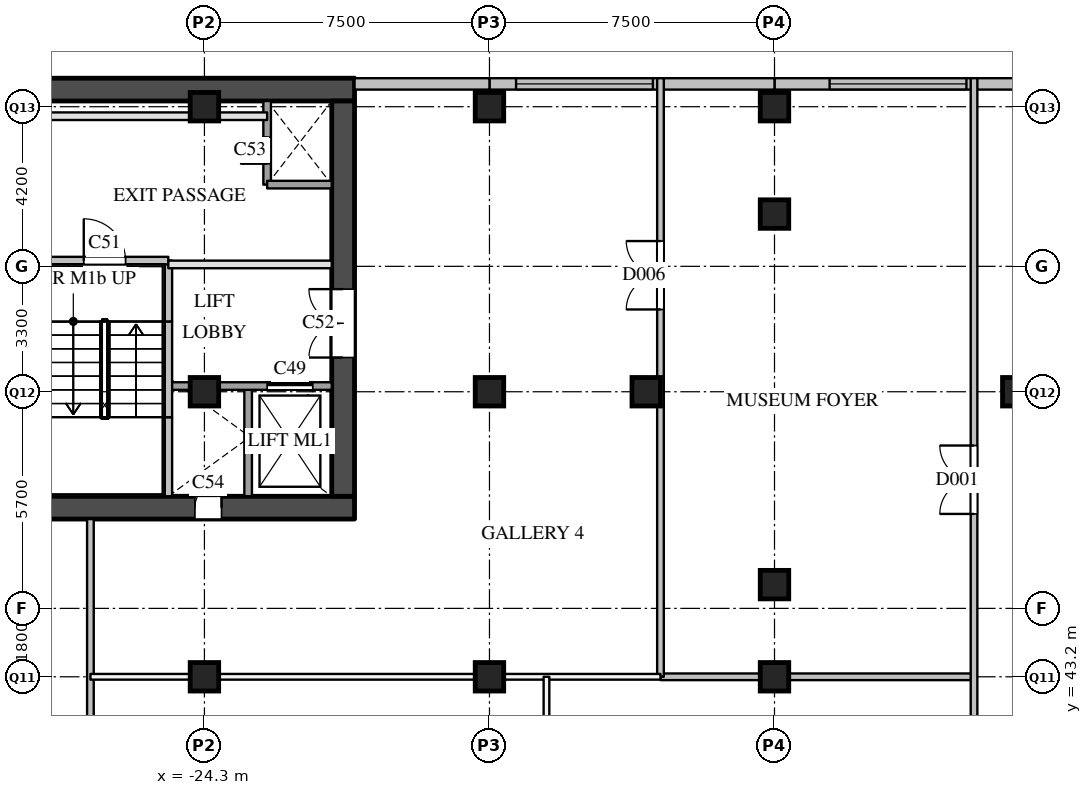
"""IFC4 building model, lengths in metres.
Left out: names, types, materials, properties, quantities, classifications, styles, units other than length and angle.
Written with IfcOpenShell. Run it as: python <this file> out.ifc"""

import sys

from ifc_helpers import new_model, si_unit, direction, frame, frame_2d, origin, origin_2d, place, context, subcontext, project, spatial, rectangle, extrude, element, fill, save


model = new_model("IFC4")
c1 = context("Model", 3, precision=1e-05, world=origin(), true_north=direction((0.0, 1.0)))
c2 = subcontext(c1, "Body", "Model", "MODEL_VIEW")
j1 = project(units=[si_unit("LENGTHUNIT", "METRE"), si_unit("PLANEANGLEUNIT", "RADIAN")], contexts=[c1])
p1 = place(None, origin())
s1 = spatial("IfcSite", under=j1, at=p1, CompositionType="ELEMENT")
p2 = place(p1, origin())
s2 = spatial("IfcBuilding", under=s1, at=p2, CompositionType="ELEMENT")
p3 = place(p2, origin())
s3 = spatial("IfcBuildingStorey", under=s2, at=p3, CompositionType="ELEMENT", Elevation=0.0)
for number, where, z_axis, x_axis in (
    (1, (-24.3, 43.2, 0.0), (0.0, 0.0, 1.0), (1.0, 0.0, 0.0)),
    (2, (-24.3, 50.7, 0.0), (0.0, 0.0, 1.0), (1.0, 0.0, 0.0)),
    (3, (-24.3, 58.2, 0.0), (0.0, 0.0, 1.0), (1.0, 0.0, 0.0)),
    (4, (-16.8, 43.2, 0.0), (0.0, 0.0, 1.0), (1.0, 0.0, 0.0)),
    (5, (-16.8, 50.7, 0.0), (0.0, 0.0, 1.0), (1.0, 0.0, 0.0)),
    (6, (-16.8, 58.2, 0.0), (0.0, 0.0, 1.0), (1.0, 0.0, 0.0)),
    (7, (-9.3, 43.2, 0.0), (0.0, 0.0, 1.0), (1.0, 0.0, 0.0)),
    (8, (-9.3, 58.2, 0.0), (0.0, 0.0, 1.0), (1.0, 0.0, 0.0)),
    (9, (-12.675, 50.7, 0.0), (0.0, 0.0, 1.0), (1.0, 0.0, 0.0)),
    (10, (-9.3, 45.625, 0.0), (0.0, 0.0, 1.0), (1.0, 0.0, 0.0)),
    (11, (-9.3, 55.375, 0.0), (0.0, 0.0, 1.0), (1.0, 0.0, 0.0)),
    (12, (-2.925, 50.7, 0.0), (0.0, 0.0, 1.0), (1.0, 0.0, 0.0)),
):
    element("IfcColumn", number, at=place(p3, frame(where, z_axis=z_axis, x_axis=x_axis)), inside=s3, PredefinedType="COLUMN", context=c2, shape_type="SweptSolid", body=[
        extrude(rectangle(XDim=0.75, YDim=0.75, at=origin_2d()), origin(), (0.0, 0.0, 1.0), 8.0),
    ])
p4 = place(p3, frame((-1.8, 58.8, 0.0), z_axis=(0.0, 0.0, 1.0), x_axis=(-1.0, 0.0, 0.0)))
e13 = element("IfcWall", 13, at=p4, inside=s3, PredefinedType="SOLIDWALL", context=c2, shape_type="SweptSolid", body=[
    extrude(rectangle(XDim=7.5, YDim=0.3, at=frame_2d((3.75, 0.0))), origin(), (0.0, 0.0, 1.0), 7.59),
])
p5 = place(p4, frame((2.45, 0.0, 0.9)))
e14 = element("IfcOpeningElement", 14, at=p5, cuts=e13, PredefinedType="OPENING", context=c2, shape_type="SweptSolid", body=[
    extrude(rectangle(XDim=3.6, YDim=3.0, at=frame_2d((1.8, 1.5))), frame((0.0, 0.16, 0.0), z_axis=(0.0, -1.0, 0.0), x_axis=(1.0, 0.0, 0.0)), (0.0, 0.0, 1.0), 0.32),
])
p6 = place(p3, frame((-9.3, 58.8, 0.0), z_axis=(0.0, 0.0, 1.0), x_axis=(-1.0, 0.0, 0.0)))
e15 = element("IfcWall", 15, at=p6, inside=s3, PredefinedType="SOLIDWALL", context=c2, shape_type="SweptSolid", body=[
    extrude(rectangle(XDim=7.5, YDim=0.3, at=frame_2d((3.75, 0.0))), origin(), (0.0, 0.0, 1.0), 7.59),
])
p7 = place(p6, frame((3.2, 0.0, 0.9)))
e16 = element("IfcOpeningElement", 16, at=p7, cuts=e15, PredefinedType="OPENING", context=c2, shape_type="SweptSolid", body=[
    extrude(rectangle(XDim=3.6, YDim=3.0, at=frame_2d((1.8, 1.5))), frame((0.0, 0.16, 0.0), z_axis=(0.0, -1.0, 0.0), x_axis=(1.0, 0.0, 0.0)), (0.0, 0.0, 1.0), 0.32),
])
p8 = place(p3, frame((-16.8, 58.8, 0.0), z_axis=(0.0, 0.0, 1.0), x_axis=(-1.0, 0.0, 0.0)))
e17 = element("IfcWall", 17, at=p8, inside=s3, PredefinedType="SOLIDWALL", context=c2, shape_type="SweptSolid", body=[
    extrude(rectangle(XDim=3.55, YDim=0.3, at=frame_2d((1.775, 0.0))), origin(), (0.0, 0.0, 1.0), 7.59),
])
p9 = place(p3, frame((-32.55, 47.65, 0.0), z_axis=(0.0, 0.0, 1.0), x_axis=(1.0, 0.0, 0.0)))
e18 = element("IfcWall", 18, at=p9, inside=s3, PredefinedType="SHEAR", context=c2, shape_type="SweptSolid", body=[
    extrude(rectangle(XDim=12.2, YDim=0.6, at=frame_2d((6.1, 0.0))), origin(), (0.0, 0.0, 1.0), 7.59),
])
p10 = place(p9, frame((8.0, 0.0, 0.0)))
e19 = element("IfcOpeningElement", 19, at=p10, cuts=e18, PredefinedType="OPENING", context=c2, shape_type="SweptSolid", body=[
    extrude(rectangle(XDim=0.7, YDim=2.1, at=frame_2d((0.35, 1.05))), frame((0.0, 0.31, 0.0), z_axis=(0.0, -1.0, 0.0), x_axis=(1.0, 0.0, 0.0)), (0.0, 0.0, 1.0), 0.62),
])
p11 = place(p3, frame((-32.55, 58.65, 0.0), z_axis=(0.0, 0.0, 1.0), x_axis=(1.0, 0.0, 0.0)))
e20 = element("IfcWall", 20, at=p11, inside=s3, PredefinedType="SHEAR", context=c2, shape_type="SweptSolid", body=[
    extrude(rectangle(XDim=12.2, YDim=0.6, at=frame_2d((6.1, 0.0))), origin(), (0.0, 0.0, 1.0), 7.59),
])
p12 = place(p3, frame((-20.65, 47.95, 0.0), z_axis=(0.0, 0.0, 1.0), x_axis=(0.0, 1.0, 0.0)))
e21 = element("IfcWall", 21, at=p12, inside=s3, PredefinedType="SHEAR", context=c2, shape_type="SweptSolid", body=[
    extrude(rectangle(XDim=10.4, YDim=0.6, at=frame_2d((5.2, 0.0))), origin(), (0.0, 0.0, 1.0), 7.59),
])
p13 = place(p12, frame((3.65, 0.0, 0.0)))
e22 = element("IfcOpeningElement", 22, at=p13, cuts=e21, PredefinedType="OPENING", context=c2, shape_type="SweptSolid", body=[
    extrude(rectangle(XDim=1.8, YDim=2.1, at=frame_2d((0.9, 1.05))), frame((0.0, 0.31, 0.0), z_axis=(0.0, -1.0, 0.0), x_axis=(1.0, 0.0, 0.0)), (0.0, 0.0, 1.0), 0.62),
])
p14 = place(p3, frame((-25.25, 47.95, 0.0), z_axis=(0.0, 0.0, 1.0), x_axis=(0.0, 1.0, 0.0)))
e23 = element("IfcWall", 23, at=p14, inside=s3, PredefinedType="SOLIDWALL", context=c2, shape_type="SweptSolid", body=[
    extrude(rectangle(XDim=2.08, YDim=0.2, at=frame_2d((1.04, 0.0))), origin(), (0.0, 0.0, 1.0), 7.59),
])
p15 = place(p3, frame((-25.25, 50.03, 0.0), z_axis=(0.0, 0.0, 1.0), x_axis=(0.0, 1.0, 0.0)))
e24 = element("IfcWall", 24, at=p15, inside=s3, PredefinedType="SOLIDWALL", context=c2, shape_type="SweptSolid", body=[
    extrude(rectangle(XDim=2.52, YDim=0.2, at=frame_2d((1.26, 0.0))), origin(), (0.0, 0.0, 1.0), 7.59),
])
p16 = place(p3, frame((-25.25, 52.55, 0.0), z_axis=(0.0, 0.0, 1.0), x_axis=(0.0, 1.0, 0.0)))
e25 = element("IfcWall", 25, at=p16, inside=s3, PredefinedType="SOLIDWALL", context=c2, shape_type="SweptSolid", body=[
    extrude(rectangle(XDim=1.6, YDim=0.2, at=frame_2d((0.8, 0.0))), origin(), (0.0, 0.0, 1.0), 7.59),
])
p17 = place(p3, frame((-23.15, 47.95, 0.0), z_axis=(0.0, 0.0, 1.0), x_axis=(0.0, 1.0, 0.0)))
e26 = element("IfcWall", 26, at=p17, inside=s3, PredefinedType="SOLIDWALL", context=c2, shape_type="SweptSolid", body=[
    extrude(rectangle(XDim=2.9, YDim=0.2, at=frame_2d((1.45, 0.0))), origin(), (0.0, 0.0, 1.0), 7.59),
])
p18 = place(p3, frame((-22.65, 56.15, 0.0), z_axis=(0.0, 0.0, 1.0), x_axis=(0.0, 1.0, 0.0)))
e27 = element("IfcWall", 27, at=p18, inside=s3, PredefinedType="SOLIDWALL", context=c2, shape_type="SweptSolid", body=[
    extrude(rectangle(XDim=2.2, YDim=0.2, at=frame_2d((1.1, 0.0))), origin(), (0.0, 0.0, 1.0), 7.59),
])
p19 = place(p18, frame((0.55, 0.0, 0.0)))
e28 = element("IfcOpeningElement", 28, at=p19, cuts=e27, PredefinedType="OPENING", context=c2, shape_type="SweptSolid", body=[
    extrude(rectangle(XDim=0.7, YDim=2.1, at=frame_2d((0.35, 1.05))), frame((0.0, 0.11, 0.0), z_axis=(0.0, -1.0, 0.0), x_axis=(1.0, 0.0, 0.0)), (0.0, 0.0, 1.0), 0.22),
])
p20 = place(p3, frame((-25.25, 50.85, 0.0), z_axis=(0.0, 0.0, 1.0), x_axis=(1.0, 0.0, 0.0)))
e29 = element("IfcWall", 29, at=p20, inside=s3, PredefinedType="SOLIDWALL", context=c2, shape_type="SweptSolid", body=[
    extrude(rectangle(XDim=4.3, YDim=0.2, at=frame_2d((2.15, 0.0))), origin(), (0.0, 0.0, 1.0), 7.59),
])
p21 = place(p20, frame((2.6, 0.0, 0.0)))
e30 = element("IfcOpeningElement", 30, at=p21, cuts=e29, PredefinedType="OPENING", context=c2, shape_type="SweptSolid", body=[
    extrude(rectangle(XDim=1.2, YDim=2.1, at=frame_2d((0.6, 1.05))), frame((0.0, 0.11, 0.0), z_axis=(0.0, -1.0, 0.0), x_axis=(1.0, 0.0, 0.0)), (0.0, 0.0, 1.0), 0.22),
])
p22 = place(p3, frame((-25.25, 54.05, 0.0), z_axis=(0.0, 0.0, 1.0), x_axis=(1.0, 0.0, 0.0)))
e31 = element("IfcWall", 31, at=p22, inside=s3, PredefinedType="PARTITIONING", context=c2, shape_type="SweptSolid", body=[
    extrude(rectangle(XDim=4.3, YDim=0.2, at=frame_2d((2.15, 0.0))), origin(), (0.0, 0.0, 1.0), 7.59),
])
p23 = place(p3, frame((-28.5, 54.15, 0.0), z_axis=(0.0, 0.0, 1.0), x_axis=(1.0, 0.0, 0.0)))
e32 = element("IfcWall", 32, at=p23, inside=s3, PredefinedType="SOLIDWALL", context=c2, shape_type="SweptSolid", body=[
    extrude(rectangle(XDim=3.25, YDim=0.2, at=frame_2d((1.625, 0.0))), origin(), (0.0, 0.0, 1.0), 7.59),
])
p24 = place(p23, frame((1.025, 0.0, 0.0)))
e33 = element("IfcOpeningElement", 33, at=p24, cuts=e32, PredefinedType="OPENING", context=c2, shape_type="SweptSolid", body=[
    extrude(rectangle(XDim=1.1, YDim=2.1, at=frame_2d((0.55, 1.05))), frame((0.0, 0.11, 0.0), z_axis=(0.0, -1.0, 0.0), x_axis=(1.0, 0.0, 0.0)), (0.0, 0.0, 1.0), 0.22),
])
p25 = place(p3, frame((-22.65, 56.15, 0.0), z_axis=(0.0, 0.0, 1.0), x_axis=(1.0, 0.0, 0.0)))
e34 = element("IfcWall", 34, at=p25, inside=s3, PredefinedType="SOLIDWALL", context=c2, shape_type="SweptSolid", body=[
    extrude(rectangle(XDim=1.7, YDim=0.2, at=frame_2d((0.85, 0.0))), origin(), (0.0, 0.0, 1.0), 7.59),
])
p26 = place(p3, frame((-31.95, 57.95, 0.0), z_axis=(0.0, 0.0, 1.0), x_axis=(1.0, 0.0, 0.0)))
e35 = element("IfcWall", 35, at=p26, inside=s3, PredefinedType="PARTITIONING", context=c2, shape_type="SweptSolid", body=[
    extrude(rectangle(XDim=9.3, YDim=0.2, at=frame_2d((4.65, 0.0))), origin(), (0.0, 0.0, 1.0), 7.59),
])
p27 = place(p3, frame((-12.3, 43.2, 0.0), z_axis=(0.0, 0.0, 1.0), x_axis=(1.0, 0.0, 0.0)))
e36 = element("IfcWall", 36, at=p27, inside=s3, PredefinedType="PARTITIONING", context=c2, shape_type="SweptSolid", body=[
    extrude(rectangle(XDim=8.25, YDim=0.175, at=frame_2d((4.125, 0.0))), origin(), (0.0, 0.0, 1.0), 6.79),
])
p28 = place(p3, frame((-27.3, 12.0, 0.0), z_axis=(0.0, 0.0, 1.0), x_axis=(0.0, 1.0, 0.0)))
e37 = element("IfcWall", 37, at=p28, inside=s3, PredefinedType="PARTITIONING", context=c2, shape_type="SweptSolid", body=[
    extrude(rectangle(XDim=35.35, YDim=0.175, at=frame_2d((17.675, 0.0))), origin(), (0.0, 0.0, 1.0), 6.79),
])
p29 = place(p28, frame((18.4, 0.0, 0.0)))
e38 = element("IfcOpeningElement", 38, at=p29, cuts=e37, PredefinedType="OPENING", context=c2, shape_type="SweptSolid", body=[
    extrude(rectangle(XDim=1.8, YDim=2.1, at=frame_2d((0.9, 1.05))), frame((0.0, 0.097, 0.0), z_axis=(0.0, -1.0, 0.0), x_axis=(1.0, 0.0, 0.0)), (0.0, 0.0, 1.0), 0.195),
])
p30 = place(p28, frame((23.7, 0.0, 0.0)))
e39 = element("IfcOpeningElement", 39, at=p30, cuts=e37, PredefinedType="OPENING", context=c2, shape_type="SweptSolid", body=[
    extrude(rectangle(XDim=1.8, YDim=2.1, at=frame_2d((0.9, 1.05))), frame((0.0, 0.097, 0.0), z_axis=(0.0, -1.0, 0.0), x_axis=(1.0, 0.0, 0.0)), (0.0, 0.0, 1.0), 0.195),
])
p31 = place(p28, frame((4.688, 0.0, 0.0)))
e40 = element("IfcOpeningElement", 40, at=p31, cuts=e37, PredefinedType="OPENING", context=c2, shape_type="SweptSolid", body=[
    extrude(rectangle(XDim=1.0, YDim=2.1, at=frame_2d((0.5, 1.05))), frame((0.0, 0.097, 0.0), z_axis=(0.0, -1.0, 0.0), x_axis=(1.0, 0.0, 0.0)), (0.0, 0.0, 1.0), 0.195),
])
p32 = place(p3, frame((-12.3, 43.2, 0.0), z_axis=(0.0, 0.0, 1.0), x_axis=(0.0, 1.0, 0.0)))
e41 = element("IfcWall", 41, at=p32, inside=s3, PredefinedType="PARTITIONING", context=c2, shape_type="SweptSolid", body=[
    extrude(rectangle(XDim=15.75, YDim=0.175, at=frame_2d((7.875, 0.0))), origin(), (0.0, 0.0, 1.0), 6.79),
])
p33 = place(p32, frame((9.665, 0.0, 0.0)))
e42 = element("IfcOpeningElement", 42, at=p33, cuts=e41, PredefinedType="OPENING", context=c2, shape_type="SweptSolid", body=[
    extrude(rectangle(XDim=1.8, YDim=2.1, at=frame_2d((0.9, 1.05))), frame((0.0, 0.097, 0.0), z_axis=(0.0, -1.0, 0.0), x_axis=(1.0, 0.0, 0.0)), (0.0, 0.0, 1.0), 0.195),
])
p34 = place(p3, frame((-4.05, -4.05, 0.0), z_axis=(0.0, 0.0, 1.0), x_axis=(0.0, 1.0, 0.0)))
e43 = element("IfcWall", 43, at=p34, inside=s3, PredefinedType="PARTITIONING", context=c2, shape_type="SweptSolid", body=[
    extrude(rectangle(XDim=63.0, YDim=0.175, at=frame_2d((31.5, 0.0))), origin(), (0.0, 0.0, 1.0), 6.79),
])
p35 = place(p34, frame((51.535, 0.0, 0.0)))
e44 = element("IfcOpeningElement", 44, at=p35, cuts=e43, PredefinedType="OPENING", context=c2, shape_type="SweptSolid", body=[
    extrude(rectangle(XDim=1.8, YDim=2.1, at=frame_2d((0.9, 1.05))), frame((0.0, 0.097, 0.0), z_axis=(0.0, -1.0, 0.0), x_axis=(1.0, 0.0, 0.0)), (0.0, 0.0, 1.0), 0.195),
])
p36 = place(p34, frame((23.25, 0.0, 0.0)))
e45 = element("IfcOpeningElement", 45, at=p36, cuts=e43, PredefinedType="OPENING", context=c2, shape_type="SweptSolid", body=[
    extrude(rectangle(XDim=1.8, YDim=2.1, at=frame_2d((0.9, 1.05))), frame((0.0, 0.097, 0.0), z_axis=(0.0, -1.0, 0.0), x_axis=(1.0, 0.0, 0.0)), (0.0, 0.0, 1.0), 0.195),
])
p37 = place(p34, frame((38.85, 0.0, 0.0)))
e46 = element("IfcOpeningElement", 46, at=p37, cuts=e43, PredefinedType="OPENING", context=c2, shape_type="SweptSolid", body=[
    extrude(rectangle(XDim=1.8, YDim=2.1, at=frame_2d((0.9, 1.05))), frame((0.0, 0.097, 0.0), z_axis=(0.0, -1.0, 0.0), x_axis=(1.0, 0.0, 0.0)), (0.0, 0.0, 1.0), 0.195),
])
p38 = place(p34, frame((8.625, 0.0, 0.0)))
e47 = element("IfcOpeningElement", 47, at=p38, cuts=e43, PredefinedType="OPENING", context=c2, shape_type="SweptSolid", body=[
    extrude(rectangle(XDim=1.8, YDim=2.1, at=frame_2d((0.9, 1.05))), frame((0.0, 0.097, 0.0), z_axis=(0.0, -1.0, 0.0), x_axis=(1.0, 0.0, 0.0)), (0.0, 0.0, 1.0), 0.195),
])
p39 = place(p3, frame((-27.3, 43.2, 0.0), z_axis=(0.0, 0.0, 1.0), x_axis=(1.0, 0.0, 0.0)))
e48 = element("IfcWall", 48, at=p39, inside=s3, PredefinedType="PARTITIONING", context=c2, shape_type="SweptSolid", body=[
    extrude(rectangle(XDim=15.0, YDim=0.15, at=frame_2d((7.5, 0.0))), origin(), (0.0, 0.0, 1.0), 6.79),
])
p40 = place(p3, frame((-15.3, 30.0, 0.0), z_axis=(0.0, 0.0, 1.0), x_axis=(0.0, 1.0, 0.0)))
e49 = element("IfcWall", 49, at=p40, inside=s3, PredefinedType="PARTITIONING", context=c2, shape_type="SweptSolid", body=[
    extrude(rectangle(XDim=13.2, YDim=0.15, at=frame_2d((6.6, 0.0))), origin(), (0.0, 0.0, 1.0), 6.79),
])
p41 = place(p40, frame((3.52, 0.0, 0.0)))
e50 = element("IfcOpeningElement", 50, at=p41, cuts=e49, PredefinedType="OPENING", context=c2, shape_type="SweptSolid", body=[
    extrude(rectangle(XDim=1.8, YDim=2.1, at=frame_2d((0.9, 1.05))), frame((0.0, 0.085, 0.0), z_axis=(0.0, -1.0, 0.0), x_axis=(1.0, 0.0, 0.0)), (0.0, 0.0, 1.0), 0.17),
])
p42 = place(p5, origin())
e51 = element("IfcWindow", 51, at=p42, inside=s3, PartitioningType="SINGLE_PANEL", PredefinedType="WINDOW", context=c2, shape_type="SweptSolid", body=[
    extrude(rectangle(XDim=3.6, YDim=3.0, at=frame_2d((1.8, 1.5))), frame((0.0, 0.03, 0.0), z_axis=(0.0, -1.0, 0.0), x_axis=(1.0, 0.0, 0.0)), (0.0, 0.0, 1.0), 0.06),
])
fill(e14, e51)
p43 = place(p7, origin())
e52 = element("IfcWindow", 52, at=p43, inside=s3, PartitioningType="SINGLE_PANEL", PredefinedType="WINDOW", context=c2, shape_type="SweptSolid", body=[
    extrude(rectangle(XDim=3.6, YDim=3.0, at=frame_2d((1.8, 1.5))), frame((0.0, 0.03, 0.0), z_axis=(0.0, -1.0, 0.0), x_axis=(1.0, 0.0, 0.0)), (0.0, 0.0, 1.0), 0.06),
])
fill(e16, e52)
p44 = place(p21, origin())
e53 = element("IfcDoor", 53, at=p44, inside=s3, OperationType="SLIDING_TO_LEFT", PredefinedType="DOOR", context=c2, shape_type="SweptSolid", body=[
    extrude(rectangle(XDim=1.2, YDim=2.1, at=frame_2d((0.6, 1.05))), frame((0.0, 0.025, 0.0), z_axis=(0.0, -1.0, 0.0), x_axis=(1.0, 0.0, 0.0)), (0.0, 0.0, 1.0), 0.05),
])
fill(e30, e53)
p45 = place(p24, origin())
e54 = element("IfcDoor", 54, at=p45, inside=s3, OperationType="SINGLE_SWING_LEFT", PredefinedType="DOOR", context=c2, shape_type="SweptSolid", body=[
    extrude(rectangle(XDim=1.1, YDim=2.1, at=frame_2d((0.55, 1.05))), frame((0.0, 0.025, 0.0), z_axis=(0.0, -1.0, 0.0), x_axis=(1.0, 0.0, 0.0)), (0.0, 0.0, 1.0), 0.05),
])
fill(e33, e54)
p46 = place(p13, origin())
e55 = element("IfcDoor", 55, at=p46, inside=s3, OperationType="DOUBLE_DOOR_SINGLE_SWING", PredefinedType="DOOR", context=c2, shape_type="SweptSolid", body=[
    extrude(rectangle(XDim=1.8, YDim=2.1, at=frame_2d((0.9, 1.05))), frame((0.0, 0.025, 0.0), z_axis=(0.0, -1.0, 0.0), x_axis=(1.0, 0.0, 0.0)), (0.0, 0.0, 1.0), 0.05),
])
fill(e22, e55)
p47 = place(p19, origin())
e56 = element("IfcDoor", 56, at=p47, inside=s3, OperationType="SINGLE_SWING_LEFT", PredefinedType="DOOR", context=c2, shape_type="SweptSolid", body=[
    extrude(rectangle(XDim=0.7, YDim=2.1, at=frame_2d((0.35, 1.05))), frame((0.0, 0.025, 0.0), z_axis=(0.0, -1.0, 0.0), x_axis=(1.0, 0.0, 0.0)), (0.0, 0.0, 1.0), 0.05),
])
fill(e28, e56)
p48 = place(p10, origin())
e57 = element("IfcDoor", 57, at=p48, inside=s3, OperationType="SINGLE_SWING_RIGHT", PredefinedType="DOOR", context=c2, shape_type="SweptSolid", body=[
    extrude(rectangle(XDim=0.7, YDim=2.1, at=frame_2d((0.35, 1.05))), frame((0.0, 0.025, 0.0), z_axis=(0.0, -1.0, 0.0), x_axis=(1.0, 0.0, 0.0)), (0.0, 0.0, 1.0), 0.05),
])
fill(e19, e57)
p49 = place(p35, origin())
e58 = element("IfcDoor", 58, at=p49, inside=s3, OperationType="DOUBLE_DOOR_SINGLE_SWING", PredefinedType="DOOR", context=c2, shape_type="SweptSolid", body=[
    extrude(rectangle(XDim=1.8, YDim=2.1, at=frame_2d((0.9, 1.05))), frame((0.0, 0.025, 0.0), z_axis=(0.0, -1.0, 0.0), x_axis=(1.0, 0.0, 0.0)), (0.0, 0.0, 1.0), 0.05),
])
fill(e44, e58)
p50 = place(p33, origin())
e59 = element("IfcDoor", 59, at=p50, inside=s3, OperationType="DOUBLE_DOOR_SINGLE_SWING", PredefinedType="DOOR", context=c2, shape_type="SweptSolid", body=[
    extrude(rectangle(XDim=1.8, YDim=2.1, at=frame_2d((0.9, 1.05))), frame((0.0, 0.025, 0.0), z_axis=(0.0, -1.0, 0.0), x_axis=(1.0, 0.0, 0.0)), (0.0, 0.0, 1.0), 0.05),
])
fill(e42, e59)
save(model, sys.argv[1])
